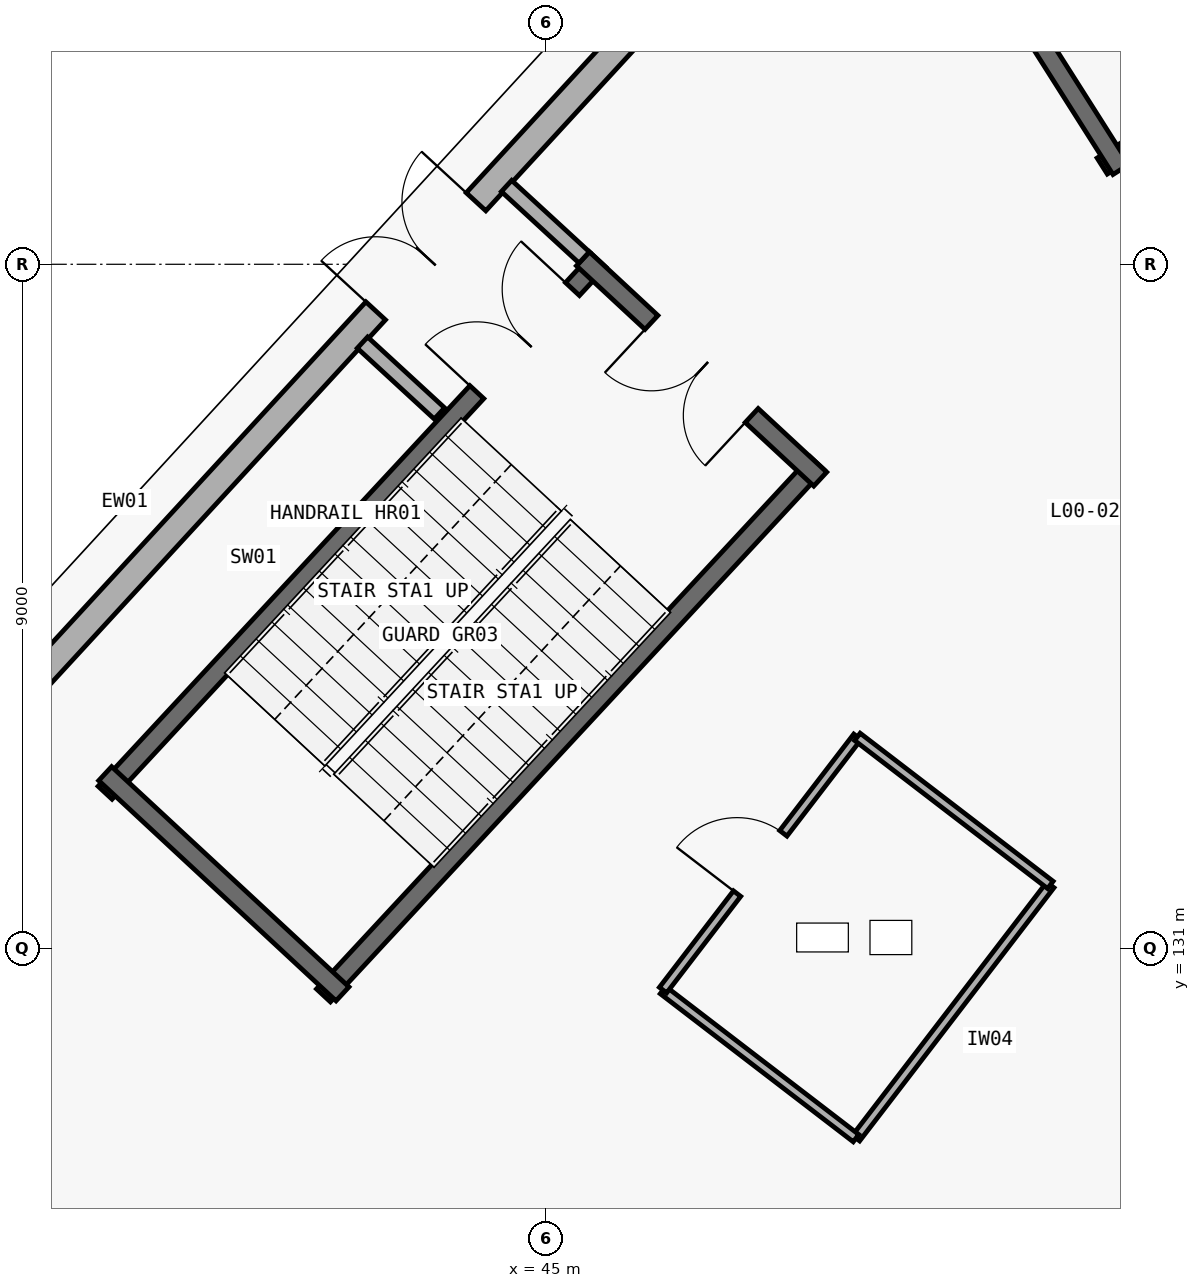
"""IFC4 building model, lengths in metres.
Left out: names, types, materials, properties, quantities, classifications, styles, units other than length and angle.
Written with IfcOpenShell. Run it as: python <this file> out.ifc"""

import sys

from ifc_helpers import new_model, si_unit, direction, frame, frame_2d, origin, place, context, subcontext, project, spatial, rectangle, extrude, element, fill, save


model = new_model("IFC4")
c1 = context("Model", 3, precision=1e-05, world=origin(), true_north=direction((0.0, 1.0)))
c2 = subcontext(c1, "Body", "Model", "MODEL_VIEW")
j1 = project(units=[si_unit("LENGTHUNIT", "METRE"), si_unit("PLANEANGLEUNIT", "RADIAN")], contexts=[c1])
p1 = place(None, origin())
s1 = spatial("IfcSite", under=j1, at=p1, CompositionType="ELEMENT")
p2 = place(p1, origin())
s2 = spatial("IfcBuilding", under=s1, at=p2, CompositionType="ELEMENT")
p3 = place(p2, origin())
s3 = spatial("IfcBuildingStorey", under=s2, at=p3, CompositionType="ELEMENT", Elevation=0.0)
p4 = place(p3, frame((34.163, 130.046, 0.0), z_axis=(0.0, 0.0, 1.0), x_axis=(0.677106454921, 0.735885078462, 0.0)))
e1 = element("IfcWall", 1, at=p4, inside=s3, PredefinedType="STANDARD", context=c2, shape_type="SweptSolid", body=[
    extrude(rectangle(XDim=20.128, YDim=0.35, at=frame_2d((10.064, 0.0))), origin(), (0.0, 0.0, 1.0), 4.165),
])
p5 = place(p4, frame((12.694, 0.0, 0.0)))
e2 = element("IfcOpeningElement", 2, at=p5, cuts=e1, PredefinedType="OPENING", context=c2, shape_type="SweptSolid", body=[
    extrude(rectangle(XDim=1.95, YDim=2.25, at=frame_2d((0.975, 1.125))), frame((0.0, 0.185, 0.0), z_axis=(0.0, -1.0, 0.0), x_axis=(1.0, 0.0, 0.0)), (0.0, 0.0, 1.0), 0.37),
])
p6 = place(p4, frame((1.118, 0.0, 0.0)))
e3 = element("IfcOpeningElement", 3, at=p6, cuts=e1, PredefinedType="OPENING", context=c2, shape_type="SweptSolid", body=[
    extrude(rectangle(XDim=3.4, YDim=2.65, at=frame_2d((1.7, 1.325))), frame((0.0, 0.185, 0.0), z_axis=(0.0, -1.0, 0.0), x_axis=(1.0, 0.0, 0.0)), (0.0, 0.0, 1.0), 0.37),
])
p7 = place(p3, frame((39.198, 133.048, 0.0), z_axis=(0.0, 0.0, 1.0), x_axis=(0.680257902718, 0.7329728411, 0.0)))
e4 = element("IfcWall", 4, at=p7, inside=s3, PredefinedType="SHEAR", context=c2, shape_type="SweptSolid", body=[
    extrude(rectangle(XDim=9.55, YDim=0.25, at=frame_2d((4.775, 0.0))), origin(), (0.0, 0.0, 1.0), 5.1),
])
p8 = place(p7, frame((7.19, 0.0, 0.0)))
e5 = element("IfcOpeningElement", 5, at=p8, cuts=e4, PredefinedType="OPENING", context=c2, shape_type="SweptSolid", body=[
    extrude(rectangle(XDim=1.85, YDim=2.3, at=frame_2d((0.925, 1.15))), frame((0.0, 0.135, 0.0), z_axis=(0.0, -1.0, 0.0), x_axis=(1.0, 0.0, 0.0)), (0.0, 0.0, 1.0), 0.27),
])
p9 = place(p3, frame((42.071, 130.381, 0.0), z_axis=(0.0, 0.0, 1.0), x_axis=(0.680245155897, 0.732984670971, 0.0)))
e6 = element("IfcWall", 6, at=p9, inside=s3, PredefinedType="SHEAR", context=c2, shape_type="SweptSolid", body=[
    extrude(rectangle(XDim=9.55, YDim=0.25, at=frame_2d((4.775, 0.0))), origin(), (0.0, 0.0, 1.0), 5.1),
])
p10 = place(p3, frame((48.607, 137.174, 0.0), z_axis=(0.0, 0.0, 1.0), x_axis=(-0.73295064559, 0.680281817433, 0.0)))
e7 = element("IfcWall", 7, at=p10, inside=s3, PredefinedType="SHEAR", context=c2, shape_type="SweptSolid", body=[
    extrude(rectangle(XDim=4.26, YDim=0.25, at=frame_2d((2.13, 0.0))), origin(), (0.0, 0.0, 1.0), 5.1),
])
p11 = place(p10, frame((1.23, 0.0, 0.0)))
e8 = element("IfcOpeningElement", 8, at=p11, cuts=e7, PredefinedType="OPENING", context=c2, shape_type="SweptSolid", body=[
    extrude(rectangle(XDim=1.8, YDim=2.25, at=frame_2d((0.9, 1.125))), frame((0.0, 0.135, 0.0), z_axis=(0.0, -1.0, 0.0), x_axis=(1.0, 0.0, 0.0)), (0.0, 0.0, 1.0), 0.27),
])
p12 = place(p3, frame((39.199, 133.299, 0.0), z_axis=(0.0, 0.0, 1.0), x_axis=(0.732977166505, -0.680253242096, 0.0)))
e9 = element("IfcWall", 9, at=p12, inside=s3, PredefinedType="SHEAR", context=c2, shape_type="SweptSolid", body=[
    extrude(rectangle(XDim=4.26, YDim=0.25, at=frame_2d((2.13, 0.0))), origin(), (0.0, 0.0, 1.0), 5.1),
])
p13 = place(p3, frame((52.317, 141.292, 0.0), z_axis=(0.0, 0.0, 1.0), x_axis=(0.844391246241, 0.535727004427, 0.0)))
e10 = element("IfcWall", 10, at=p13, inside=s3, PredefinedType="SHEAR", context=c2, shape_type="SweptSolid", body=[
    extrude(rectangle(XDim=9.55, YDim=0.25, at=frame_2d((4.775, 0.0))), origin(), (0.0, 0.0, 1.0), 5.1),
])
p14 = place(p3, frame((50.282, 144.845, 0.0), z_axis=(0.0, 0.0, 1.0), x_axis=(0.535684577572, -0.844418162613, 0.0)))
e11 = element("IfcWall", 11, at=p14, inside=s3, PredefinedType="SHEAR", context=c2, shape_type="SweptSolid", body=[
    extrude(rectangle(XDim=4.26, YDim=0.25, at=frame_2d((2.13, 0.0))), origin(), (0.0, 0.0, 1.0), 5.1),
])
p15 = place(p3, frame((45.502, 140.09, 0.0), z_axis=(0.0, 0.0, 1.0), x_axis=(-0.73594853595, 0.677037482296, 0.0)))
e12 = element("IfcWall", 12, at=p15, inside=s3, PredefinedType="PARTITIONING", context=c2, shape_type="SweptSolid", body=[
    extrude(rectangle(XDim=1.388, YDim=0.2, at=frame_2d((0.694, 0.0))), origin(), (0.0, 0.0, 1.0), 4.165),
])
p16 = place(p3, frame((43.597, 138.038, 0.0), z_axis=(0.0, 0.0, 1.0), x_axis=(-0.735842657053, 0.677152555973, 0.0)))
e13 = element("IfcWall", 13, at=p16, inside=s3, PredefinedType="PARTITIONING", context=c2, shape_type="SweptSolid", body=[
    extrude(rectangle(XDim=1.377, YDim=0.2, at=frame_2d((0.688, 0.0))), origin(), (0.0, 0.0, 1.0), 4.165),
])
p17 = place(p3, frame((51.635, 131.835, 0.0), z_axis=(0.0, 0.0, 1.0), x_axis=(-0.608817083681, -0.793310631858, 0.0)))
e14 = element("IfcWall", 14, at=p17, inside=s3, PredefinedType="PARTITIONING", context=c2, shape_type="SweptSolid", body=[
    extrude(rectangle(XDim=4.2, YDim=0.12, at=frame_2d((2.1, 0.0))), origin(), (0.0, 0.0, 1.0), 5.08),
])
p18 = place(p3, frame((49.078, 128.503, 0.0), z_axis=(0.0, 0.0, 1.0), x_axis=(-0.793369307425, 0.60874061967, 0.0)))
e15 = element("IfcWall", 15, at=p18, inside=s3, PredefinedType="PARTITIONING", context=c2, shape_type="SweptSolid", body=[
    extrude(rectangle(XDim=3.2, YDim=0.12, at=frame_2d((1.6, 0.0))), origin(), (0.0, 0.0, 1.0), 5.08),
])
p19 = place(p3, frame((46.539, 130.451, 0.0), z_axis=(0.0, 0.0, 1.0), x_axis=(0.608780500298, 0.793338706012, 0.0)))
e16 = element("IfcWall", 16, at=p19, inside=s3, PredefinedType="PARTITIONING", context=c2, shape_type="SweptSolid", body=[
    extrude(rectangle(XDim=4.2, YDim=0.12, at=frame_2d((2.1, 0.0))), origin(), (0.0, 0.0, 1.0), 5.08),
])
p20 = place(p19, frame((1.6, 0.0, 0.0)))
e17 = element("IfcOpeningElement", 17, at=p20, cuts=e16, PredefinedType="OPENING", context=c2, shape_type="SweptSolid", body=[
    extrude(rectangle(XDim=1.0, YDim=2.1, at=frame_2d((0.5, 1.05))), frame((0.0, 0.07, 0.0), z_axis=(0.0, -1.0, 0.0), x_axis=(1.0, 0.0, 0.0)), (0.0, 0.0, 1.0), 0.14),
])
p21 = place(p3, frame((49.096, 133.783, 0.0), z_axis=(0.0, 0.0, 1.0), x_axis=(0.793397576328, -0.608703775146, 0.0)))
e18 = element("IfcWall", 18, at=p21, inside=s3, PredefinedType="PARTITIONING", context=c2, shape_type="SweptSolid", body=[
    extrude(rectangle(XDim=3.2, YDim=0.12, at=frame_2d((1.6, 0.0))), origin(), (0.0, 0.0, 1.0), 5.08),
])
p22 = place(p5, origin())
e19 = element("IfcDoor", 19, at=p22, inside=s3, OperationType="DOUBLE_DOOR_SINGLE_SWING", PredefinedType="DOOR", context=c2, shape_type="SweptSolid", body=[
    extrude(rectangle(XDim=1.95, YDim=2.25, at=frame_2d((0.975, 1.125))), frame((0.0, 0.025, 0.0), z_axis=(0.0, -1.0, 0.0), x_axis=(1.0, 0.0, 0.0)), (0.0, 0.0, 1.0), 0.05),
])
fill(e2, e19)
p23 = place(p11, origin())
e20 = element("IfcDoor", 20, at=p23, inside=s3, OperationType="DOUBLE_DOOR_SINGLE_SWING", PredefinedType="DOOR", context=c2, shape_type="SweptSolid", body=[
    extrude(rectangle(XDim=1.8, YDim=2.25, at=frame_2d((0.9, 1.125))), frame((0.0, 0.025, 0.0), z_axis=(0.0, -1.0, 0.0), x_axis=(1.0, 0.0, 0.0)), (0.0, 0.0, 1.0), 0.05),
])
fill(e8, e20)
p24 = place(p8, origin())
e21 = element("IfcDoor", 21, at=p24, inside=s3, OperationType="DOUBLE_DOOR_SINGLE_SWING", PredefinedType="DOOR", context=c2, shape_type="SweptSolid", body=[
    extrude(rectangle(XDim=1.85, YDim=2.3, at=frame_2d((0.925, 1.15))), frame((0.0, 0.025, 0.0), z_axis=(0.0, -1.0, 0.0), x_axis=(1.0, 0.0, 0.0)), (0.0, 0.0, 1.0), 0.05),
])
fill(e5, e21)
p25 = place(p20, origin())
e22 = element("IfcDoor", 22, at=p25, inside=s3, OperationType="SINGLE_SWING_LEFT", PredefinedType="DOOR", context=c2, shape_type="SweptSolid", body=[
    extrude(rectangle(XDim=1.0, YDim=2.1, at=frame_2d((0.5, 1.05))), frame((0.0, 0.025, 0.0), z_axis=(0.0, -1.0, 0.0), x_axis=(1.0, 0.0, 0.0)), (0.0, 0.0, 1.0), 0.05),
])
fill(e17, e22)
save(model, sys.argv[1])
